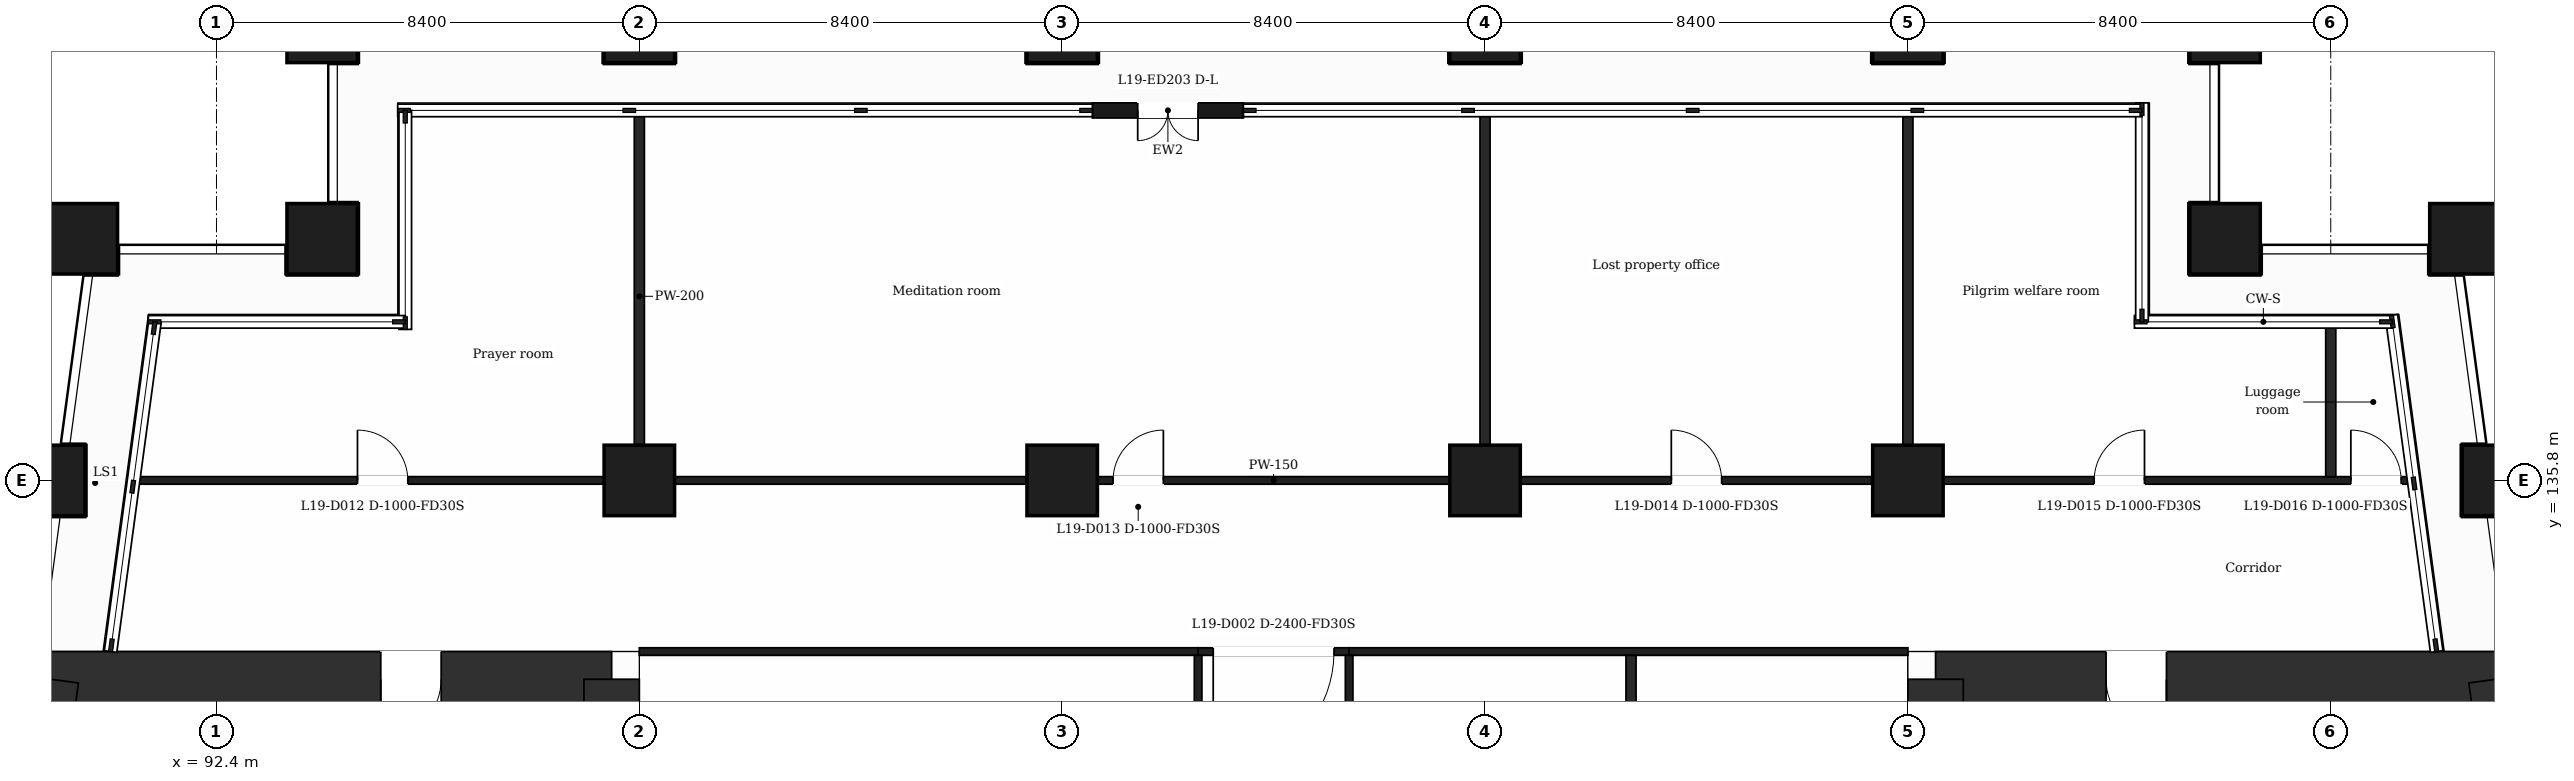
"""IFC4 building model, lengths in metres.
Left out: names, types, materials, properties, quantities, classifications, styles, units other than length and angle.
Written with IfcOpenShell. Run it as: python <this file> out.ifc"""

import sys

from ifc_helpers import new_model, si_unit, direction, frame, frame_2d, origin, origin_2d, place, context, subcontext, project, spatial, rectangle, extrude, element, fill, save


model = new_model("IFC4")
c1 = context("Model", 3, precision=1e-05, world=origin(), true_north=direction((0.0, 1.0)))
c2 = subcontext(c1, "Body", "Model", "MODEL_VIEW")
j1 = project(units=[si_unit("LENGTHUNIT", "METRE"), si_unit("PLANEANGLEUNIT", "RADIAN")], contexts=[c1])
p1 = place(None, origin())
s1 = spatial("IfcSite", under=j1, at=p1, CompositionType="ELEMENT")
p2 = place(p1, origin())
s2 = spatial("IfcBuilding", under=s1, at=p2, CompositionType="ELEMENT")
p3 = place(p2, frame((0.0, 0.0, 86.0)))
s3 = spatial("IfcBuildingStorey", under=s2, at=p3, CompositionType="ELEMENT", Elevation=86.0)
p4 = place(p3, frame((89.112, 131.85, 0.0), z_axis=(0.0, 0.0, 1.0), x_axis=(1.0, 0.0, 0.0)))
e1 = element("IfcWall", 1, at=p4, inside=s3, PredefinedType="SHEAR", context=c2, shape_type="SweptSolid", body=[
    extrude(rectangle(XDim=11.138, YDim=1.1, at=frame_2d((5.569, 0.0))), origin(), (0.0, 0.0, 1.0), 5.0),
])
p5 = place(p4, frame((6.552, 0.0, 0.0)))
e2 = element("IfcOpeningElement", 2, at=p5, cuts=e1, PredefinedType="OPENING", context=c2, shape_type="SweptSolid", body=[
    extrude(rectangle(XDim=1.2, YDim=2.1, at=frame_2d((0.6, 1.05))), frame((0.0, 0.56, 0.0), z_axis=(0.0, -1.0, 0.0), x_axis=(1.0, 0.0, 0.0)), (0.0, 0.0, 1.0), 1.12),
])
p6 = place(p3, frame((100.25, 131.85, 0.0), z_axis=(0.0, 0.0, 1.0), x_axis=(0.0, -1.0, 0.0)))
e3 = element("IfcWall", 3, at=p6, inside=s3, PredefinedType="SHEAR", context=c2, shape_type="SweptSolid", body=[
    extrude(rectangle(XDim=20.9, YDim=1.1, at=frame_2d((10.45, 0.0))), origin(), (0.0, 0.0, 1.0), 5.0),
])
p7 = place(p6, frame((7.7, 0.0, 0.0)))
e4 = element("IfcOpeningElement", 4, at=p7, cuts=e3, PredefinedType="OPENING", context=c2, shape_type="SweptSolid", body=[
    extrude(rectangle(XDim=1.4, YDim=2.1, at=frame_2d((0.7, 1.05))), frame((0.0, 0.56, 0.0), z_axis=(0.0, -1.0, 0.0), x_axis=(1.0, 0.0, 0.0)), (0.0, 0.0, 1.0), 1.12),
])
p8 = place(p3, frame((86.298, 110.95, 0.0), z_axis=(0.0, 0.0, 1.0), x_axis=(0.133400422634, 0.99106222168, 0.0)))
e5 = element("IfcWall", 5, at=p8, inside=s3, PredefinedType="SHEAR", context=c2, shape_type="SweptSolid", body=[
    extrude(rectangle(XDim=21.089, YDim=1.1, at=frame_2d((10.544, 0.0))), origin(), (0.0, 0.0, 1.0), 5.0),
])
p9 = place(p3, frame((126.55, 131.85, 0.0), z_axis=(0.0, 0.0, 1.0), x_axis=(1.0, 0.0, 0.0)))
e6 = element("IfcWall", 6, at=p9, inside=s3, PredefinedType="SHEAR", context=c2, shape_type="SweptSolid", body=[
    extrude(rectangle(XDim=11.138, YDim=1.1, at=frame_2d((5.569, 0.0))), origin(), (0.0, 0.0, 1.0), 5.0),
])
p10 = place(p9, frame((3.386, 0.0, 0.0)))
e7 = element("IfcOpeningElement", 7, at=p10, cuts=e6, PredefinedType="OPENING", context=c2, shape_type="SweptSolid", body=[
    extrude(rectangle(XDim=1.2, YDim=2.1, at=frame_2d((0.6, 1.05))), frame((0.0, 0.56, 0.0), z_axis=(0.0, -1.0, 0.0), x_axis=(1.0, 0.0, 0.0)), (0.0, 0.0, 1.0), 1.12),
])
p11 = place(p3, frame((137.688, 131.85, 0.0), z_axis=(0.0, 0.0, 1.0), x_axis=(0.133411793472, -0.991060691059, 0.0)))
e8 = element("IfcWall", 8, at=p11, inside=s3, PredefinedType="SHEAR", context=c2, shape_type="SweptSolid", body=[
    extrude(rectangle(XDim=21.089, YDim=1.1, at=frame_2d((10.544, 0.0))), origin(), (0.0, 0.0, 1.0), 5.0),
])
p12 = place(p3, frame((126.55, 110.95, 0.0), z_axis=(0.0, 0.0, 1.0), x_axis=(0.0, 1.0, 0.0)))
e9 = element("IfcWall", 9, at=p12, inside=s3, PredefinedType="SHEAR", context=c2, shape_type="SweptSolid", body=[
    extrude(rectangle(XDim=20.9, YDim=1.1, at=frame_2d((10.45, 0.0))), origin(), (0.0, 0.0, 1.0), 5.0),
])
p13 = place(p12, frame((11.8, 0.0, 0.0)))
e10 = element("IfcOpeningElement", 10, at=p13, cuts=e9, PredefinedType="OPENING", context=c2, shape_type="SweptSolid", body=[
    extrude(rectangle(XDim=1.4, YDim=2.1, at=frame_2d((0.7, 1.05))), frame((0.0, 0.56, 0.0), z_axis=(0.0, -1.0, 0.0), x_axis=(1.0, 0.0, 0.0)), (0.0, 0.0, 1.0), 1.12),
])
for number, where, z_axis, x_axis in (
    (11, (94.5, 140.6, 0.0), (0.0, 0.0, 1.0), (1.0, 0.0, 0.0)),
    (12, (132.3, 140.6, 0.0), (0.0, 0.0, 1.0), (1.0, 0.0, 0.0)),
    (13, (89.735, 140.6, 0.0), (0.0, 0.0, 1.0), (1.0, 0.0, 0.0)),
    (14, (137.065, 140.6, 0.0), (0.0, 0.0, 1.0), (1.0, 0.0, 0.0)),
    (15, (100.8, 135.8, 0.0), (0.0, 0.0, 1.0), (1.0, 0.0, 0.0)),
    (16, (109.2, 135.8, 0.0), (0.0, 0.0, 1.0), (1.0, 0.0, 0.0)),
    (17, (117.6, 135.8, 0.0), (0.0, 0.0, 1.0), (1.0, 0.0, 0.0)),
    (18, (126.0, 135.8, 0.0), (0.0, 0.0, 1.0), (1.0, 0.0, 0.0)),
    (19, (89.088, 135.8, 0.0), (0.0, 0.0, 1.0), (1.0, 0.0, 0.0)),
    (20, (137.711, 135.8, 0.0), (0.0, 0.0, 1.0), (1.0, 0.0, 0.0)),
    (21, (100.8, 144.8, 0.0), (0.0, 0.0, 1.0), (1.0, 0.0, 0.0)),
    (22, (109.2, 144.8, 0.0), (0.0, 0.0, 1.0), (1.0, 0.0, 0.0)),
    (23, (117.6, 144.8, 0.0), (0.0, 0.0, 1.0), (1.0, 0.0, 0.0)),
    (24, (126.0, 144.8, 0.0), (0.0, 0.0, 1.0), (1.0, 0.0, 0.0)),
    (25, (94.5, 144.8, 0.0), (0.0, 0.0, 1.0), (1.0, 0.0, 0.0)),
    (26, (132.3, 144.8, 0.0), (0.0, 0.0, 1.0), (1.0, 0.0, 0.0)),
):
    element("IfcColumn", number, at=place(p3, frame(where, z_axis=z_axis, x_axis=x_axis)), inside=s3, PredefinedType="COLUMN", context=c2, shape_type="SweptSolid", body=[
        extrude(rectangle(XDim=1.4, YDim=1.4, at=origin_2d()), origin(), (0.0, 0.0, 1.0), 5.0),
    ])
p14 = place(p3, frame((112.8, 143.15, 0.0), z_axis=(0.0, 0.0, 1.0), x_axis=(-1.0, 0.0, 0.0)))
e27 = element("IfcWall", 27, at=p14, inside=s3, PredefinedType="SOLIDWALL", context=c2, shape_type="SweptSolid", body=[
    extrude(rectangle(XDim=3.0, YDim=0.3, at=frame_2d((1.5, 0.0))), origin(), (0.0, 0.0, 1.0), 4.68),
])
p15 = place(p14, frame((0.9, 0.0, 0.0)))
e28 = element("IfcOpeningElement", 28, at=p15, cuts=e27, PredefinedType="OPENING", context=c2, shape_type="SweptSolid", body=[
    extrude(rectangle(XDim=1.2, YDim=2.4, at=frame_2d((0.6, 1.2))), frame((0.0, 0.16, 0.0), z_axis=(0.0, -1.0, 0.0), x_axis=(1.0, 0.0, 0.0)), (0.0, 0.0, 1.0), 0.32),
])
p16 = place(p3, frame((111.9, 132.4, 0.0), z_axis=(0.0, 0.0, 1.0), x_axis=(1.0, 0.0, 0.0)))
e29 = element("IfcWall", 29, at=p16, inside=s3, PredefinedType="PARTITIONING", context=c2, shape_type="SweptSolid", body=[
    extrude(rectangle(XDim=3.0, YDim=0.15, at=frame_2d((1.5, 0.0))), origin(), (0.0, 0.0, 1.0), 4.68),
])
p17 = place(p16, frame((0.3, 0.0, 0.0)))
e30 = element("IfcOpeningElement", 30, at=p17, cuts=e29, PredefinedType="OPENING", context=c2, shape_type="SweptSolid", body=[
    extrude(rectangle(XDim=2.4, YDim=2.1, at=frame_2d((1.2, 1.05))), frame((0.0, 0.085, 0.0), z_axis=(0.0, -1.0, 0.0), x_axis=(1.0, 0.0, 0.0)), (0.0, 0.0, 1.0), 0.17),
])
p18 = place(p3, frame((100.8, 132.4, 0.0), z_axis=(0.0, 0.0, 1.0), x_axis=(1.0, 0.0, 0.0)))
e31 = element("IfcWall", 31, at=p18, inside=s3, PredefinedType="PARTITIONING", context=c2, shape_type="SweptSolid", body=[
    extrude(rectangle(XDim=11.1, YDim=0.15, at=frame_2d((5.55, 0.0))), origin(), (0.0, 0.0, 1.0), 4.68),
])
p19 = place(p3, frame((114.9, 132.4, 0.0), z_axis=(0.0, 0.0, 1.0), x_axis=(1.0, 0.0, 0.0)))
e32 = element("IfcWall", 32, at=p19, inside=s3, PredefinedType="PARTITIONING", context=c2, shape_type="SweptSolid", body=[
    extrude(rectangle(XDim=11.1, YDim=0.15, at=frame_2d((5.55, 0.0))), origin(), (0.0, 0.0, 1.0), 4.68),
])
p20 = place(p3, frame((90.864, 135.8, 0.0), z_axis=(0.0, 0.0, 1.0), x_axis=(1.0, 0.0, 0.0)))
e33 = element("IfcWall", 33, at=p20, inside=s3, PredefinedType="PARTITIONING", context=c2, shape_type="SweptSolid", body=[
    extrude(rectangle(XDim=45.072, YDim=0.15, at=frame_2d((22.536, 0.0))), origin(), (0.0, 0.0, 1.0), 4.68),
])
p21 = place(p20, frame((4.337, 0.0, 0.0)))
e34 = element("IfcOpeningElement", 34, at=p21, cuts=e33, PredefinedType="OPENING", context=c2, shape_type="SweptSolid", body=[
    extrude(rectangle(XDim=1.0, YDim=2.1, at=frame_2d((0.5, 1.05))), frame((0.0, 0.085, 0.0), z_axis=(0.0, -1.0, 0.0), x_axis=(1.0, 0.0, 0.0)), (0.0, 0.0, 1.0), 0.17),
])
p22 = place(p20, frame((19.346, 0.0, 0.0)))
e35 = element("IfcOpeningElement", 35, at=p22, cuts=e33, PredefinedType="OPENING", context=c2, shape_type="SweptSolid", body=[
    extrude(rectangle(XDim=1.0, YDim=2.1, at=frame_2d((0.5, 1.05))), frame((0.0, 0.085, 0.0), z_axis=(0.0, -1.0, 0.0), x_axis=(1.0, 0.0, 0.0)), (0.0, 0.0, 1.0), 0.17),
])
p23 = place(p20, frame((30.436, 0.0, 0.0)))
e36 = element("IfcOpeningElement", 36, at=p23, cuts=e33, PredefinedType="OPENING", context=c2, shape_type="SweptSolid", body=[
    extrude(rectangle(XDim=1.0, YDim=2.1, at=frame_2d((0.5, 1.05))), frame((0.0, 0.085, 0.0), z_axis=(0.0, -1.0, 0.0), x_axis=(1.0, 0.0, 0.0)), (0.0, 0.0, 1.0), 0.17),
])
p24 = place(p20, frame((38.836, 0.0, 0.0)))
e37 = element("IfcOpeningElement", 37, at=p24, cuts=e33, PredefinedType="OPENING", context=c2, shape_type="SweptSolid", body=[
    extrude(rectangle(XDim=1.0, YDim=2.1, at=frame_2d((0.5, 1.05))), frame((0.0, 0.085, 0.0), z_axis=(0.0, -1.0, 0.0), x_axis=(1.0, 0.0, 0.0)), (0.0, 0.0, 1.0), 0.17),
])
p25 = place(p20, frame((43.935, 0.0, 0.0)))
e38 = element("IfcOpeningElement", 38, at=p25, cuts=e33, PredefinedType="OPENING", context=c2, shape_type="SweptSolid", body=[
    extrude(rectangle(XDim=1.0, YDim=2.1, at=frame_2d((0.5, 1.05))), frame((0.0, 0.085, 0.0), z_axis=(0.0, -1.0, 0.0), x_axis=(1.0, 0.0, 0.0)), (0.0, 0.0, 1.0), 0.17),
])
p26 = place(p3, frame((100.8, 135.875, 0.0), z_axis=(0.0, 0.0, 1.0), x_axis=(0.0, 1.0, 0.0)))
e39 = element("IfcWall", 39, at=p26, inside=s3, PredefinedType="PARTITIONING", context=c2, shape_type="SweptSolid", body=[
    extrude(rectangle(XDim=7.165, YDim=0.2, at=frame_2d((3.583, 0.0))), origin(), (0.0, 0.0, 1.0), 4.68),
])
for number, where, z_axis, x_axis in (
    (40, (111.9, 127.675, 0.0), (0.0, 0.0, 1.0), (0.0, 1.0, 0.0)),
    (41, (114.9, 127.675, 0.0), (0.0, 0.0, 1.0), (0.0, 1.0, 0.0)),
):
    element("IfcWall", number, at=place(p3, frame(where, z_axis=z_axis, x_axis=x_axis)), inside=s3, PredefinedType="PARTITIONING", context=c2, shape_type="SweptSolid", body=[
        extrude(rectangle(XDim=4.65, YDim=0.15, at=frame_2d((2.325, 0.0))), origin(), (0.0, 0.0, 1.0), 4.68),
    ])
p27 = place(p3, frame((117.6, 135.875, 0.0), z_axis=(0.0, 0.0, 1.0), x_axis=(0.0, 1.0, 0.0)))
e42 = element("IfcWall", 42, at=p27, inside=s3, PredefinedType="PARTITIONING", context=c2, shape_type="SweptSolid", body=[
    extrude(rectangle(XDim=7.165, YDim=0.2, at=frame_2d((3.583, 0.0))), origin(), (0.0, 0.0, 1.0), 4.68),
])
p28 = place(p3, frame((120.5, 127.675, 0.0), z_axis=(0.0, 0.0, 1.0), x_axis=(0.0, 1.0, 0.0)))
e43 = element("IfcWall", 43, at=p28, inside=s3, PredefinedType="PARTITIONING", context=c2, shape_type="SweptSolid", body=[
    extrude(rectangle(XDim=4.65, YDim=0.2, at=frame_2d((2.325, 0.0))), origin(), (0.0, 0.0, 1.0), 4.68),
])
p29 = place(p3, frame((126.0, 135.875, 0.0), z_axis=(0.0, 0.0, 1.0), x_axis=(0.0, 1.0, 0.0)))
e44 = element("IfcWall", 44, at=p29, inside=s3, PredefinedType="PARTITIONING", context=c2, shape_type="SweptSolid", body=[
    extrude(rectangle(XDim=7.165, YDim=0.2, at=frame_2d((3.583, 0.0))), origin(), (0.0, 0.0, 1.0), 4.68),
])
p30 = place(p3, frame((134.4, 135.875, 0.0), z_axis=(0.0, 0.0, 1.0), x_axis=(0.0, 1.0, 0.0)))
e45 = element("IfcWall", 45, at=p30, inside=s3, PredefinedType="PARTITIONING", context=c2, shape_type="SweptSolid", body=[
    extrude(rectangle(XDim=2.965, YDim=0.2, at=frame_2d((1.482, 0.0))), origin(), (0.0, 0.0, 1.0), 4.68),
])
p31 = place(p15, origin())
e46 = element("IfcDoor", 46, at=p31, inside=s3, OperationType="DOUBLE_DOOR_SINGLE_SWING", PredefinedType="DOOR", context=c2, shape_type="SweptSolid", body=[
    extrude(rectangle(XDim=1.2, YDim=2.4, at=frame_2d((0.6, 1.2))), frame((0.0, 0.025, 0.0), z_axis=(0.0, -1.0, 0.0), x_axis=(1.0, 0.0, 0.0)), (0.0, 0.0, 1.0), 0.05),
])
fill(e28, e46)
p32 = place(p17, origin())
e47 = element("IfcDoor", 47, at=p32, inside=s3, OperationType="SINGLE_SWING_LEFT", PredefinedType="DOOR", context=c2, shape_type="SweptSolid", body=[
    extrude(rectangle(XDim=2.4, YDim=2.1, at=frame_2d((1.2, 1.05))), frame((0.0, 0.025, 0.0), z_axis=(0.0, -1.0, 0.0), x_axis=(1.0, 0.0, 0.0)), (0.0, 0.0, 1.0), 0.05),
])
fill(e30, e47)
p33 = place(p21, origin())
e48 = element("IfcDoor", 48, at=p33, inside=s3, OperationType="SINGLE_SWING_LEFT", PredefinedType="DOOR", context=c2, shape_type="SweptSolid", body=[
    extrude(rectangle(XDim=1.0, YDim=2.1, at=frame_2d((0.5, 1.05))), frame((0.0, 0.025, 0.0), z_axis=(0.0, -1.0, 0.0), x_axis=(1.0, 0.0, 0.0)), (0.0, 0.0, 1.0), 0.05),
])
fill(e34, e48)
p34 = place(p22, origin())
e49 = element("IfcDoor", 49, at=p34, inside=s3, OperationType="SINGLE_SWING_RIGHT", PredefinedType="DOOR", context=c2, shape_type="SweptSolid", body=[
    extrude(rectangle(XDim=1.0, YDim=2.1, at=frame_2d((0.5, 1.05))), frame((0.0, 0.025, 0.0), z_axis=(0.0, -1.0, 0.0), x_axis=(1.0, 0.0, 0.0)), (0.0, 0.0, 1.0), 0.05),
])
fill(e35, e49)
p35 = place(p23, origin())
e50 = element("IfcDoor", 50, at=p35, inside=s3, OperationType="SINGLE_SWING_LEFT", PredefinedType="DOOR", context=c2, shape_type="SweptSolid", body=[
    extrude(rectangle(XDim=1.0, YDim=2.1, at=frame_2d((0.5, 1.05))), frame((0.0, 0.025, 0.0), z_axis=(0.0, -1.0, 0.0), x_axis=(1.0, 0.0, 0.0)), (0.0, 0.0, 1.0), 0.05),
])
fill(e36, e50)
p36 = place(p24, origin())
e51 = element("IfcDoor", 51, at=p36, inside=s3, OperationType="SINGLE_SWING_RIGHT", PredefinedType="DOOR", context=c2, shape_type="SweptSolid", body=[
    extrude(rectangle(XDim=1.0, YDim=2.1, at=frame_2d((0.5, 1.05))), frame((0.0, 0.025, 0.0), z_axis=(0.0, -1.0, 0.0), x_axis=(1.0, 0.0, 0.0)), (0.0, 0.0, 1.0), 0.05),
])
fill(e37, e51)
p37 = place(p25, origin())
e52 = element("IfcDoor", 52, at=p37, inside=s3, OperationType="SINGLE_SWING_LEFT", PredefinedType="DOOR", context=c2, shape_type="SweptSolid", body=[
    extrude(rectangle(XDim=1.0, YDim=2.1, at=frame_2d((0.5, 1.05))), frame((0.0, 0.025, 0.0), z_axis=(0.0, -1.0, 0.0), x_axis=(1.0, 0.0, 0.0)), (0.0, 0.0, 1.0), 0.05),
])
fill(e38, e52)
p38 = place(p5, origin())
e53 = element("IfcDoor", 53, at=p38, inside=s3, OperationType="SINGLE_SWING_LEFT", PredefinedType="DOOR", context=c2, shape_type="SweptSolid", body=[
    extrude(rectangle(XDim=1.2, YDim=2.1, at=frame_2d((0.6, 1.05))), frame((0.0, 0.025, 0.0), z_axis=(0.0, -1.0, 0.0), x_axis=(1.0, 0.0, 0.0)), (0.0, 0.0, 1.0), 0.05),
])
fill(e2, e53)
p39 = place(p10, origin())
e54 = element("IfcDoor", 54, at=p39, inside=s3, OperationType="SINGLE_SWING_RIGHT", PredefinedType="DOOR", context=c2, shape_type="SweptSolid", body=[
    extrude(rectangle(XDim=1.2, YDim=2.1, at=frame_2d((0.6, 1.05))), frame((0.0, 0.025, 0.0), z_axis=(0.0, -1.0, 0.0), x_axis=(1.0, 0.0, 0.0)), (0.0, 0.0, 1.0), 0.05),
])
fill(e7, e54)
save(model, sys.argv[1])
